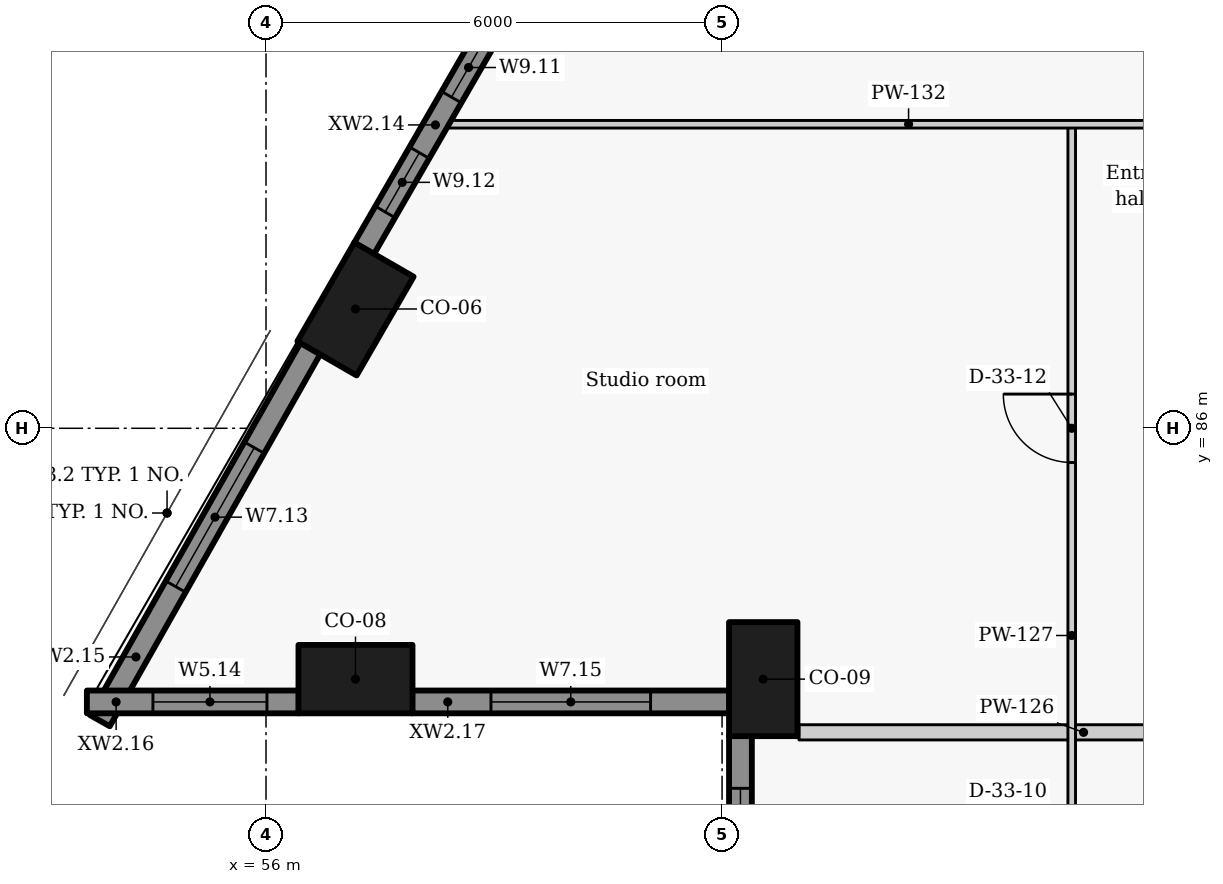
"""IFC4 building model, lengths in metres.
Left out: names, types, materials, properties, quantities, classifications, styles, units other than length and angle.
Written with IfcOpenShell. Run it as: python <this file> out.ifc"""

import sys

from ifc_helpers import new_model, si_unit, direction, frame, frame_2d, origin, origin_2d, place, context, subcontext, project, spatial, rectangle, extrude, element, fill, save


model = new_model("IFC4")
c1 = context("Model", 3, precision=1e-05, world=origin(), true_north=direction((0.0, 1.0)))
c2 = subcontext(c1, "Body", "Model", "MODEL_VIEW")
j1 = project(units=[si_unit("LENGTHUNIT", "METRE"), si_unit("PLANEANGLEUNIT", "RADIAN")], contexts=[c1])
p1 = place(None, origin())
s1 = spatial("IfcSite", under=j1, at=p1, CompositionType="ELEMENT")
p2 = place(p1, origin())
s2 = spatial("IfcBuilding", under=s1, at=p2, CompositionType="ELEMENT")
p3 = place(p2, frame((0.0, 0.0, 51.3)))
s3 = spatial("IfcBuildingStorey", under=s2, at=p3, CompositionType="ELEMENT", Elevation=51.3)
for number, where, z_axis, x_axis in (
    (1, (57.177, 87.57, 0.0), (0.0, 0.0, 1.0), (-0.5, -0.866, 0.0)),
    (2, (57.177, 82.7, 0.0), (0.0, 0.0, 1.0), (1.0, 0.0, 0.0)),
    (3, (62.542, 82.7, 0.0), (0.0, 0.0, 1.0), (0.0, -1.0, 0.0)),
):
    element("IfcColumn", number, at=place(p3, frame(where, z_axis=z_axis, x_axis=x_axis)), inside=s3, PredefinedType="COLUMN", context=c2, shape_type="SweptSolid", body=[
        extrude(rectangle(XDim=1.5, YDim=0.9, at=origin_2d()), origin(), (0.0, 0.0, 1.0), 3.3),
    ])
p4 = place(p3, frame((59.059, 91.429, 0.0), z_axis=(0.0, 0.0, 1.0), x_axis=(-0.499977402622, -0.866038449993, 0.0)))
e4 = element("IfcWall", 4, at=p4, inside=s3, PredefinedType="SOLIDWALL", context=c2, shape_type="SweptSolid", body=[
    extrude(rectangle(XDim=3.537, YDim=0.3, at=frame_2d((1.769, 0.0))), origin(), (0.0, 0.0, 1.0), 2.425),
])
p5 = place(p4, frame((0.338, 0.0, 0.9)))
e5 = element("IfcOpeningElement", 5, at=p5, cuts=e4, PredefinedType="OPENING", context=c2, shape_type="SweptSolid", body=[
    extrude(rectangle(XDim=0.9, YDim=1.1, at=frame_2d((0.45, 0.55))), frame((0.0, 0.16, 0.0), z_axis=(0.0, -1.0, 0.0), x_axis=(1.0, 0.0, 0.0)), (0.0, 0.0, 1.0), 0.32),
])
p6 = place(p4, frame((2.082, 0.0, 0.9)))
e6 = element("IfcOpeningElement", 6, at=p6, cuts=e4, PredefinedType="OPENING", context=c2, shape_type="SweptSolid", body=[
    extrude(rectangle(XDim=0.9, YDim=1.1, at=frame_2d((0.45, 0.55))), frame((0.0, 0.16, 0.0), z_axis=(0.0, -1.0, 0.0), x_axis=(1.0, 0.0, 0.0)), (0.0, 0.0, 1.0), 0.32),
])
p7 = place(p3, frame((56.584, 87.051, 0.0), z_axis=(0.0, 0.0, 1.0), x_axis=(-0.492363204642, -0.870389840655, 0.0)))
e7 = element("IfcWall", 7, at=p7, inside=s3, PredefinedType="SOLIDWALL", context=c2, shape_type="SweptSolid", body=[
    extrude(rectangle(XDim=5.626, YDim=0.3, at=frame_2d((2.813, 0.0))), origin(), (0.0, 0.0, 1.0), 2.425),
])
p8 = place(p7, frame((1.5, 0.0, 0.9)))
e8 = element("IfcOpeningElement", 8, at=p8, cuts=e7, PredefinedType="OPENING", context=c2, shape_type="SweptSolid", body=[
    extrude(rectangle(XDim=2.1, YDim=1.1, at=frame_2d((1.05, 0.55))), frame((0.0, 0.16, 0.0), z_axis=(0.0, -1.0, 0.0), x_axis=(1.0, 0.0, 0.0)), (0.0, 0.0, 1.0), 0.32),
])
p9 = place(p3, frame((53.643, 82.4, 0.0), z_axis=(0.0, 0.0, 1.0), x_axis=(1.0, 0.0, 0.0)))
e9 = element("IfcWall", 9, at=p9, inside=s3, PredefinedType="SOLIDWALL", context=c2, shape_type="SweptSolid", body=[
    extrude(rectangle(XDim=2.788, YDim=0.3, at=frame_2d((1.394, 0.0))), origin(), (0.0, 0.0, 1.0), 2.425),
])
p10 = place(p9, frame((0.869, 0.0, 0.9)))
e10 = element("IfcOpeningElement", 10, at=p10, cuts=e9, PredefinedType="OPENING", context=c2, shape_type="SweptSolid", body=[
    extrude(rectangle(XDim=1.5, YDim=1.1, at=frame_2d((0.75, 0.55))), frame((0.0, 0.16, 0.0), z_axis=(0.0, -1.0, 0.0), x_axis=(1.0, 0.0, 0.0)), (0.0, 0.0, 1.0), 0.32),
])
p11 = place(p3, frame((57.923, 82.4, 0.0), z_axis=(0.0, 0.0, 1.0), x_axis=(1.0, 0.0, 0.0)))
e11 = element("IfcWall", 11, at=p11, inside=s3, PredefinedType="SOLIDWALL", context=c2, shape_type="SweptSolid", body=[
    extrude(rectangle(XDim=4.173, YDim=0.3, at=frame_2d((2.086, 0.0))), origin(), (0.0, 0.0, 1.0), 2.425),
])
p12 = place(p11, frame((1.036, 0.0, 0.9)))
e12 = element("IfcOpeningElement", 12, at=p12, cuts=e11, PredefinedType="OPENING", context=c2, shape_type="SweptSolid", body=[
    extrude(rectangle(XDim=2.1, YDim=1.1, at=frame_2d((1.05, 0.55))), frame((0.0, 0.16, 0.0), z_axis=(0.0, -1.0, 0.0), x_axis=(1.0, 0.0, 0.0)), (0.0, 0.0, 1.0), 0.32),
])
p13 = place(p3, frame((62.242, 81.954, 0.0), z_axis=(0.0, 0.0, 1.0), x_axis=(0.0, -1.0, 0.0)))
e13 = element("IfcWall", 13, at=p13, inside=s3, PredefinedType="SOLIDWALL", context=c2, shape_type="SweptSolid", body=[
    extrude(rectangle(XDim=4.208, YDim=0.3, at=frame_2d((2.104, 0.0))), origin(), (0.0, 0.0, 1.0), 2.425),
])
p14 = place(p13, frame((0.691, 0.0, 0.9)))
e14 = element("IfcOpeningElement", 14, at=p14, cuts=e13, PredefinedType="OPENING", context=c2, shape_type="SweptSolid", body=[
    extrude(rectangle(XDim=1.5, YDim=1.1, at=frame_2d((0.75, 0.55))), frame((0.0, 0.16, 0.0), z_axis=(0.0, -1.0, 0.0), x_axis=(1.0, 0.0, 0.0)), (0.0, 0.0, 1.0), 0.32),
])
p15 = place(p13, frame((3.058, 0.0, 0.9)))
e15 = element("IfcOpeningElement", 15, at=p15, cuts=e13, PredefinedType="OPENING", context=c2, shape_type="SweptSolid", body=[
    extrude(rectangle(XDim=0.9, YDim=1.1, at=frame_2d((0.45, 0.55))), frame((0.0, 0.16, 0.0), z_axis=(0.0, -1.0, 0.0), x_axis=(1.0, 0.0, 0.0)), (0.0, 0.0, 1.0), 0.32),
])
p16 = place(p3, frame((63.012, 82.0, 0.0), z_axis=(0.0, 0.0, 1.0), x_axis=(1.0, 0.0, 0.0)))
e16 = element("IfcWall", 16, at=p16, inside=s3, PredefinedType="PARTITIONING", context=c2, shape_type="SweptSolid", body=[
    extrude(rectangle(XDim=7.488, YDim=0.2, at=frame_2d((3.744, 0.0))), origin(), (0.0, 0.0, 1.0), 2.505),
])
p17 = place(p3, frame((66.6, 72.0, 0.0), z_axis=(0.0, 0.0, 1.0), x_axis=(0.0, 1.0, 0.0)))
e17 = element("IfcWall", 17, at=p17, inside=s3, PredefinedType="PARTITIONING", context=c2, shape_type="SweptSolid", body=[
    extrude(rectangle(XDim=18.0, YDim=0.1, at=frame_2d((9.0, 0.0))), origin(), (0.0, 0.0, 1.0), 3.025),
])
p18 = place(p17, frame((1.002, 0.0, 0.0)))
e18 = element("IfcOpeningElement", 18, at=p18, cuts=e17, PredefinedType="OPENING", context=c2, shape_type="SweptSolid", body=[
    extrude(rectangle(XDim=0.9, YDim=2.1, at=frame_2d((0.45, 1.05))), frame((0.0, 0.06, 0.0), z_axis=(0.0, -1.0, 0.0), x_axis=(1.0, 0.0, 0.0)), (0.0, 0.0, 1.0), 0.12),
])
p19 = place(p17, frame((4.55, 0.0, 0.0)))
e19 = element("IfcOpeningElement", 19, at=p19, cuts=e17, PredefinedType="OPENING", context=c2, shape_type="SweptSolid", body=[
    extrude(rectangle(XDim=0.9, YDim=2.1, at=frame_2d((0.45, 1.05))), frame((0.0, 0.06, 0.0), z_axis=(0.0, -1.0, 0.0), x_axis=(1.0, 0.0, 0.0)), (0.0, 0.0, 1.0), 0.12),
])
p20 = place(p17, frame((8.098, 0.0, 0.0)))
e20 = element("IfcOpeningElement", 20, at=p20, cuts=e17, PredefinedType="OPENING", context=c2, shape_type="SweptSolid", body=[
    extrude(rectangle(XDim=0.9, YDim=2.1, at=frame_2d((0.45, 1.05))), frame((0.0, 0.06, 0.0), z_axis=(0.0, -1.0, 0.0), x_axis=(1.0, 0.0, 0.0)), (0.0, 0.0, 1.0), 0.12),
])
p21 = place(p17, frame((13.55, 0.0, 0.0)))
e21 = element("IfcOpeningElement", 21, at=p21, cuts=e17, PredefinedType="OPENING", context=c2, shape_type="SweptSolid", body=[
    extrude(rectangle(XDim=0.9, YDim=2.1, at=frame_2d((0.45, 1.05))), frame((0.0, 0.06, 0.0), z_axis=(0.0, -1.0, 0.0), x_axis=(1.0, 0.0, 0.0)), (0.0, 0.0, 1.0), 0.12),
])
p22 = place(p3, frame((58.407, 90.0, 0.0), z_axis=(0.0, 0.0, 1.0), x_axis=(1.0, 0.0, 0.0)))
e22 = element("IfcWall", 22, at=p22, inside=s3, PredefinedType="PARTITIONING", context=c2, shape_type="SweptSolid", body=[
    extrude(rectangle(XDim=12.093, YDim=0.1, at=frame_2d((6.046, 0.0))), origin(), (0.0, 0.0, 1.0), 2.405),
])
p23 = place(p5, origin())
e23 = element("IfcWindow", 23, at=p23, inside=s3, PartitioningType="SINGLE_PANEL", PredefinedType="WINDOW", context=c2, shape_type="SweptSolid", body=[
    extrude(rectangle(XDim=0.9, YDim=1.1, at=frame_2d((0.45, 0.55))), frame((0.0, 0.03, 0.0), z_axis=(0.0, -1.0, 0.0), x_axis=(1.0, 0.0, 0.0)), (0.0, 0.0, 1.0), 0.06),
])
fill(e5, e23)
p24 = place(p6, origin())
e24 = element("IfcWindow", 24, at=p24, inside=s3, PartitioningType="SINGLE_PANEL", PredefinedType="WINDOW", context=c2, shape_type="SweptSolid", body=[
    extrude(rectangle(XDim=0.9, YDim=1.1, at=frame_2d((0.45, 0.55))), frame((0.0, 0.03, 0.0), z_axis=(0.0, -1.0, 0.0), x_axis=(1.0, 0.0, 0.0)), (0.0, 0.0, 1.0), 0.06),
])
fill(e6, e24)
p25 = place(p8, origin())
e25 = element("IfcWindow", 25, at=p25, inside=s3, PartitioningType="SINGLE_PANEL", PredefinedType="WINDOW", context=c2, shape_type="SweptSolid", body=[
    extrude(rectangle(XDim=2.1, YDim=1.1, at=frame_2d((1.05, 0.55))), frame((0.0, 0.03, 0.0), z_axis=(0.0, -1.0, 0.0), x_axis=(1.0, 0.0, 0.0)), (0.0, 0.0, 1.0), 0.06),
])
fill(e8, e25)
p26 = place(p10, origin())
e26 = element("IfcWindow", 26, at=p26, inside=s3, PartitioningType="SINGLE_PANEL", PredefinedType="WINDOW", context=c2, shape_type="SweptSolid", body=[
    extrude(rectangle(XDim=1.5, YDim=1.1, at=frame_2d((0.75, 0.55))), frame((0.0, 0.03, 0.0), z_axis=(0.0, -1.0, 0.0), x_axis=(1.0, 0.0, 0.0)), (0.0, 0.0, 1.0), 0.06),
])
fill(e10, e26)
p27 = place(p12, origin())
e27 = element("IfcWindow", 27, at=p27, inside=s3, PartitioningType="SINGLE_PANEL", PredefinedType="WINDOW", context=c2, shape_type="SweptSolid", body=[
    extrude(rectangle(XDim=2.1, YDim=1.1, at=frame_2d((1.05, 0.55))), frame((0.0, 0.03, 0.0), z_axis=(0.0, -1.0, 0.0), x_axis=(1.0, 0.0, 0.0)), (0.0, 0.0, 1.0), 0.06),
])
fill(e12, e27)
p28 = place(p14, origin())
e28 = element("IfcWindow", 28, at=p28, inside=s3, PartitioningType="SINGLE_PANEL", PredefinedType="WINDOW", context=c2, shape_type="SweptSolid", body=[
    extrude(rectangle(XDim=1.5, YDim=1.1, at=frame_2d((0.75, 0.55))), frame((0.0, 0.03, 0.0), z_axis=(0.0, -1.0, 0.0), x_axis=(1.0, 0.0, 0.0)), (0.0, 0.0, 1.0), 0.06),
])
fill(e14, e28)
p29 = place(p21, origin())
e29 = element("IfcDoor", 29, at=p29, inside=s3, OperationType="SINGLE_SWING_RIGHT", PredefinedType="DOOR", context=c2, shape_type="SweptSolid", body=[
    extrude(rectangle(XDim=0.9, YDim=2.1, at=frame_2d((0.45, 1.05))), frame((0.0, 0.025, 0.0), z_axis=(0.0, -1.0, 0.0), x_axis=(1.0, 0.0, 0.0)), (0.0, 0.0, 1.0), 0.05),
])
fill(e21, e29)
save(model, sys.argv[1])
